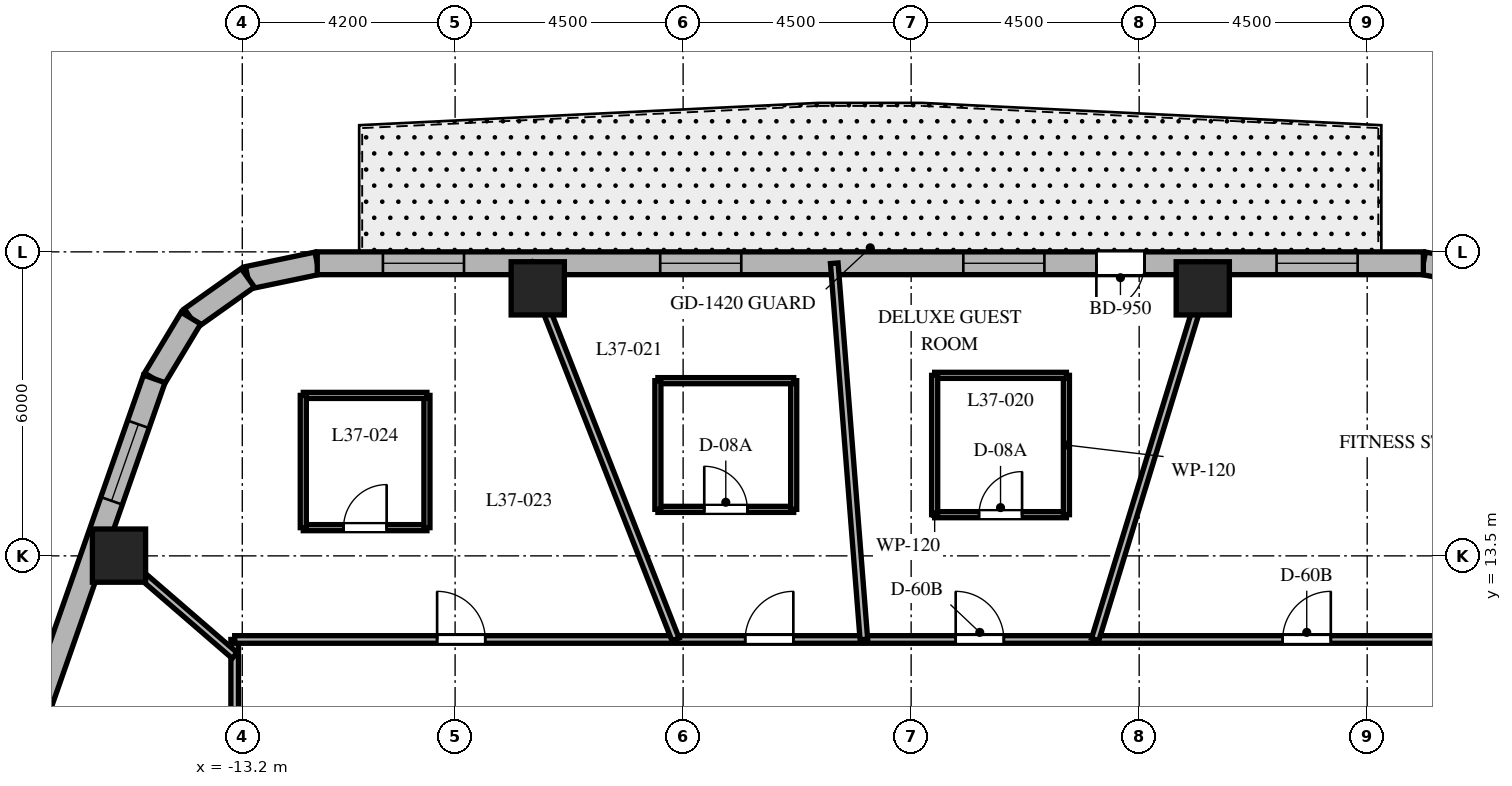
"""IFC4 building model, lengths in metres.
Left out: names, types, materials, properties, quantities, classifications, styles, units other than length and angle.
Written with IfcOpenShell. Run it as: python <this file> out.ifc"""

import sys

from ifc_helpers import new_model, si_unit, direction, frame, frame_2d, origin, origin_2d, place, context, subcontext, project, spatial, rectangle, extrude, element, fill, save


model = new_model("IFC4")
c1 = context("Model", 3, precision=1e-05, world=origin(), true_north=direction((0.0, 1.0)))
c2 = subcontext(c1, "Body", "Model", "MODEL_VIEW")
j1 = project(units=[si_unit("LENGTHUNIT", "METRE"), si_unit("PLANEANGLEUNIT", "RADIAN")], contexts=[c1])
p1 = place(None, origin())
s1 = spatial("IfcSite", under=j1, at=p1, CompositionType="ELEMENT")
p2 = place(p1, origin())
s2 = spatial("IfcBuilding", under=s1, at=p2, CompositionType="ELEMENT")
p3 = place(p2, frame((0.0, 0.0, 151.7)))
s3 = spatial("IfcBuildingStorey", under=s2, at=p3, CompositionType="ELEMENT", Elevation=151.7)
for number, where, z_axis, x_axis in (
    (1, (5.755, 18.78, 0.0), (0.0, 0.0, 1.0), (1.0, 0.0, 0.0)),
    (2, (-7.369, 18.78, 0.0), (0.0, 0.0, 1.0), (1.0, 0.0, 0.0)),
    (3, (-15.633, 13.505, 0.0), (0.0, 0.0, 1.0), (1.0, 0.0, 0.0)),
):
    element("IfcColumn", number, at=place(p3, frame(where, z_axis=z_axis, x_axis=x_axis)), inside=s3, PredefinedType="COLUMN", context=c2, shape_type="SweptSolid", body=[
        extrude(rectangle(XDim=1.05, YDim=1.05, at=origin_2d()), origin(), (0.0, 0.0, 1.0), 3.7),
    ])
p4 = place(p3, frame((11.349, 19.043, 0.0), z_axis=(0.0, 0.0, 1.0), x_axis=(-0.982931267051, 0.183973161772, 0.0)))
e4 = element("IfcWall", 4, at=p4, inside=s3, PredefinedType="SOLIDWALL", context=c2, shape_type="SweptSolid", body=[
    extrude(rectangle(XDim=1.262, YDim=0.45, at=frame_2d((0.631, 0.0))), origin(), (0.0, 0.0, 1.0), 3.4),
])
p5 = place(p3, frame((-11.72, 19.275, 0.0), z_axis=(0.0, 0.0, 1.0), x_axis=(-0.97893106758, -0.204191001093, 0.0)))
e5 = element("IfcWall", 5, at=p5, inside=s3, PredefinedType="SOLIDWALL", context=c2, shape_type="SweptSolid", body=[
    extrude(rectangle(XDim=1.4, YDim=0.45, at=frame_2d((0.7, 0.0))), origin(), (0.0, 0.0, 1.0), 3.4),
])
p6 = place(p3, frame((-13.091, 18.989, 0.0), z_axis=(0.0, 0.0, 1.0), x_axis=(-0.815574637848, -0.578651890258, 0.0)))
e6 = element("IfcWall", 6, at=p6, inside=s3, PredefinedType="SOLIDWALL", context=c2, shape_type="SweptSolid", body=[
    extrude(rectangle(XDim=1.377, YDim=0.45, at=frame_2d((0.688, 0.0))), origin(), (0.0, 0.0, 1.0), 3.4),
])
p7 = place(p3, frame((-14.214, 18.192, 0.0), z_axis=(0.0, 0.0, 1.0), x_axis=(-0.516340945502, -0.856383108193, 0.0)))
e7 = element("IfcWall", 7, at=p7, inside=s3, PredefinedType="SOLIDWALL", context=c2, shape_type="SweptSolid", body=[
    extrude(rectangle(XDim=1.4, YDim=0.45, at=frame_2d((0.7, 0.0))), origin(), (0.0, 0.0, 1.0), 3.4),
])
p8 = place(p3, frame((10.108, 19.275, 0.0), z_axis=(0.0, 0.0, 1.0), x_axis=(-1.0, 0.0, 0.0)))
e8 = element("IfcWall", 8, at=p8, inside=s3, PredefinedType="SOLIDWALL", context=c2, shape_type="SweptSolid", body=[
    extrude(rectangle(XDim=21.829, YDim=0.45, at=frame_2d((10.915, 0.0))), origin(), (0.0, 0.0, 1.0), 3.4),
])
p9 = place(p8, frame((5.503, 0.0, 0.0)))
e9 = element("IfcOpeningElement", 9, at=p9, cuts=e8, PredefinedType="OPENING", context=c2, shape_type="SweptSolid", body=[
    extrude(rectangle(XDim=0.95, YDim=2.15, at=frame_2d((0.475, 1.075))), frame((0.0, 0.235, 0.0), z_axis=(0.0, -1.0, 0.0), x_axis=(1.0, 0.0, 0.0)), (0.0, 0.0, 1.0), 0.47),
])
p10 = place(p8, frame((1.297, 0.0, 0.8)))
e10 = element("IfcOpeningElement", 10, at=p10, cuts=e8, PredefinedType="OPENING", context=c2, shape_type="SweptSolid", body=[
    extrude(rectangle(XDim=1.6, YDim=1.75, at=frame_2d((0.8, 0.875))), frame((0.0, 0.235, 0.0), z_axis=(0.0, -1.0, 0.0), x_axis=(1.0, 0.0, 0.0)), (0.0, 0.0, 1.0), 0.47),
])
p11 = place(p8, frame((7.479, 0.0, 0.8)))
e11 = element("IfcOpeningElement", 11, at=p11, cuts=e8, PredefinedType="OPENING", context=c2, shape_type="SweptSolid", body=[
    extrude(rectangle(XDim=1.6, YDim=1.75, at=frame_2d((0.8, 0.875))), frame((0.0, 0.235, 0.0), z_axis=(0.0, -1.0, 0.0), x_axis=(1.0, 0.0, 0.0)), (0.0, 0.0, 1.0), 0.47),
])
p12 = place(p8, frame((13.461, 0.0, 0.8)))
e12 = element("IfcOpeningElement", 12, at=p12, cuts=e8, PredefinedType="OPENING", context=c2, shape_type="SweptSolid", body=[
    extrude(rectangle(XDim=1.6, YDim=1.75, at=frame_2d((0.8, 0.875))), frame((0.0, 0.235, 0.0), z_axis=(0.0, -1.0, 0.0), x_axis=(1.0, 0.0, 0.0)), (0.0, 0.0, 1.0), 0.47),
])
p13 = place(p8, frame((18.933, 0.0, 0.8)))
e13 = element("IfcOpeningElement", 13, at=p13, cuts=e8, PredefinedType="OPENING", context=c2, shape_type="SweptSolid", body=[
    extrude(rectangle(XDim=1.6, YDim=1.75, at=frame_2d((0.8, 0.875))), frame((0.0, 0.235, 0.0), z_axis=(0.0, -1.0, 0.0), x_axis=(1.0, 0.0, 0.0)), (0.0, 0.0, 1.0), 0.47),
])
p14 = place(p3, frame((-14.937, 16.993, 0.0), z_axis=(0.0, 0.0, 1.0), x_axis=(-0.330431575061, -0.943829949834, 0.0)))
e14 = element("IfcWall", 14, at=p14, inside=s3, PredefinedType="SOLIDWALL", context=c2, shape_type="SweptSolid", body=[
    extrude(rectangle(XDim=17.689, YDim=0.45, at=frame_2d((8.844, 0.0))), origin(), (0.0, 0.0, 1.0), 3.4),
])
p15 = place(p14, frame((0.95, 0.0, 0.8)))
e15 = element("IfcOpeningElement", 15, at=p15, cuts=e14, PredefinedType="OPENING", context=c2, shape_type="SweptSolid", body=[
    extrude(rectangle(XDim=1.6, YDim=1.75, at=frame_2d((0.8, 0.875))), frame((0.0, 0.235, 0.0), z_axis=(0.0, -1.0, 0.0), x_axis=(1.0, 0.0, 0.0)), (0.0, 0.0, 1.0), 0.47),
])
p16 = place(p14, frame((7.99, 0.0, 0.8)))
e16 = element("IfcOpeningElement", 16, at=p16, cuts=e14, PredefinedType="OPENING", context=c2, shape_type="SweptSolid", body=[
    extrude(rectangle(XDim=1.6, YDim=1.75, at=frame_2d((0.8, 0.875))), frame((0.0, 0.235, 0.0), z_axis=(0.0, -1.0, 0.0), x_axis=(1.0, 0.0, 0.0)), (0.0, 0.0, 1.0), 0.47),
])
p17 = place(p14, frame((15.084, 0.0, 0.8)))
e17 = element("IfcOpeningElement", 17, at=p17, cuts=e14, PredefinedType="OPENING", context=c2, shape_type="SweptSolid", body=[
    extrude(rectangle(XDim=1.6, YDim=1.75, at=frame_2d((0.8, 0.875))), frame((0.0, 0.235, 0.0), z_axis=(0.0, -1.0, 0.0), x_axis=(1.0, 0.0, 0.0)), (0.0, 0.0, 1.0), 0.47),
])
p18 = place(p3, frame((-13.35, -11.85, 0.0), z_axis=(0.0, 0.0, 1.0), x_axis=(0.0, 1.0, 0.0)))
e18 = element("IfcWall", 18, at=p18, inside=s3, PredefinedType="PARTITIONING", context=c2, shape_type="SweptSolid", body=[
    extrude(rectangle(XDim=23.7, YDim=0.15, at=frame_2d((11.85, 0.0))), origin(), (0.0, 0.0, 1.0), 2.84),
])
p19 = place(p18, frame((18.389, 0.0, 0.0)))
e19 = element("IfcOpeningElement", 19, at=p19, cuts=e18, PredefinedType="OPENING", context=c2, shape_type="SweptSolid", body=[
    extrude(rectangle(XDim=0.95, YDim=2.03, at=frame_2d((0.475, 1.015))), frame((0.0, 0.085, 0.0), z_axis=(0.0, -1.0, 0.0), x_axis=(1.0, 0.0, 0.0)), (0.0, 0.0, 1.0), 0.17),
])
p20 = place(p18, frame((10.751, 0.0, 0.0)))
e20 = element("IfcOpeningElement", 20, at=p20, cuts=e18, PredefinedType="OPENING", context=c2, shape_type="SweptSolid", body=[
    extrude(rectangle(XDim=0.95, YDim=2.03, at=frame_2d((0.475, 1.015))), frame((0.0, 0.085, 0.0), z_axis=(0.0, -1.0, 0.0), x_axis=(1.0, 0.0, 0.0)), (0.0, 0.0, 1.0), 0.17),
])
p21 = place(p18, frame((5.951, 0.0, 0.0)))
e21 = element("IfcOpeningElement", 21, at=p21, cuts=e18, PredefinedType="OPENING", context=c2, shape_type="SweptSolid", body=[
    extrude(rectangle(XDim=0.9, YDim=2.03, at=frame_2d((0.45, 1.015))), frame((0.0, 0.085, 0.0), z_axis=(0.0, -1.0, 0.0), x_axis=(1.0, 0.0, 0.0)), (0.0, 0.0, 1.0), 0.17),
])
p22 = place(p18, frame((1.993, 0.0, 0.0)))
e22 = element("IfcOpeningElement", 22, at=p22, cuts=e18, PredefinedType="OPENING", context=c2, shape_type="SweptSolid", body=[
    extrude(rectangle(XDim=0.9, YDim=2.03, at=frame_2d((0.45, 1.015))), frame((0.0, 0.085, 0.0), z_axis=(0.0, -1.0, 0.0), x_axis=(1.0, 0.0, 0.0)), (0.0, 0.0, 1.0), 0.17),
])
p23 = place(p3, frame((-13.35, 11.85, 0.0), z_axis=(0.0, 0.0, 1.0), x_axis=(1.0, 0.0, 0.0)))
e23 = element("IfcWall", 23, at=p23, inside=s3, PredefinedType="PARTITIONING", context=c2, shape_type="SweptSolid", body=[
    extrude(rectangle(XDim=26.7, YDim=0.15, at=frame_2d((13.35, 0.0))), origin(), (0.0, 0.0, 1.0), 2.84),
])
p24 = place(p23, frame((20.682, 0.0, 0.0)))
e24 = element("IfcOpeningElement", 24, at=p24, cuts=e23, PredefinedType="OPENING", context=c2, shape_type="SweptSolid", body=[
    extrude(rectangle(XDim=0.95, YDim=2.03, at=frame_2d((0.475, 1.015))), frame((0.0, 0.085, 0.0), z_axis=(0.0, -1.0, 0.0), x_axis=(1.0, 0.0, 0.0)), (0.0, 0.0, 1.0), 0.17),
])
p25 = place(p23, frame((14.229, 0.0, 0.0)))
e25 = element("IfcOpeningElement", 25, at=p25, cuts=e23, PredefinedType="OPENING", context=c2, shape_type="SweptSolid", body=[
    extrude(rectangle(XDim=0.95, YDim=2.03, at=frame_2d((0.475, 1.015))), frame((0.0, 0.085, 0.0), z_axis=(0.0, -1.0, 0.0), x_axis=(1.0, 0.0, 0.0)), (0.0, 0.0, 1.0), 0.17),
])
p26 = place(p23, frame((10.075, 0.0, 0.0)))
e26 = element("IfcOpeningElement", 26, at=p26, cuts=e23, PredefinedType="OPENING", context=c2, shape_type="SweptSolid", body=[
    extrude(rectangle(XDim=0.95, YDim=2.03, at=frame_2d((0.475, 1.015))), frame((0.0, 0.085, 0.0), z_axis=(0.0, -1.0, 0.0), x_axis=(1.0, 0.0, 0.0)), (0.0, 0.0, 1.0), 0.17),
])
p27 = place(p23, frame((3.995, 0.0, 0.0)))
e27 = element("IfcOpeningElement", 27, at=p27, cuts=e23, PredefinedType="OPENING", context=c2, shape_type="SweptSolid", body=[
    extrude(rectangle(XDim=0.95, YDim=2.03, at=frame_2d((0.475, 1.015))), frame((0.0, 0.085, 0.0), z_axis=(0.0, -1.0, 0.0), x_axis=(1.0, 0.0, 0.0)), (0.0, 0.0, 1.0), 0.17),
])
p28 = place(p3, frame((3.631, 11.85, 0.0), z_axis=(0.0, 0.0, 1.0), x_axis=(0.293007573338, 0.956110120209, 0.0)))
e28 = element("IfcWall", 28, at=p28, inside=s3, PredefinedType="PARTITIONING", context=c2, shape_type="SweptSolid", body=[
    extrude(rectangle(XDim=7.766, YDim=0.15, at=frame_2d((3.883, 0.0))), origin(), (0.0, 0.0, 1.0), 2.64),
])
p29 = place(p3, frame((-0.933, 11.85, 0.0), z_axis=(0.0, 0.0, 1.0), x_axis=(-0.078476156849, 0.996915990847, 0.0)))
e29 = element("IfcWall", 29, at=p29, inside=s3, PredefinedType="PARTITIONING", context=c2, shape_type="SweptSolid", body=[
    extrude(rectangle(XDim=7.448, YDim=0.15, at=frame_2d((3.724, 0.0))), origin(), (0.0, 0.0, 1.0), 2.64),
])
p30 = place(p3, frame((-4.65, 11.85, 0.0), z_axis=(0.0, 0.0, 1.0), x_axis=(-0.365265947993, 0.930903210456, 0.0)))
e30 = element("IfcWall", 30, at=p30, inside=s3, PredefinedType="PARTITIONING", context=c2, shape_type="SweptSolid", body=[
    extrude(rectangle(XDim=7.976, YDim=0.15, at=frame_2d((3.988, 0.0))), origin(), (0.0, 0.0, 1.0), 2.64),
])
p31 = place(p3, frame((-13.35, 11.533, 0.0), z_axis=(0.0, 0.0, 1.0), x_axis=(-0.756711647314, 0.65374879183, 0.0)))
e31 = element("IfcWall", 31, at=p31, inside=s3, PredefinedType="PARTITIONING", context=c2, shape_type="SweptSolid", body=[
    extrude(rectangle(XDim=3.55, YDim=0.15, at=frame_2d((1.775, 0.0))), origin(), (0.0, 0.0, 1.0), 2.64),
])
p32 = place(p3, frame((0.464, 14.313, 0.0), z_axis=(0.0, 0.0, 1.0), x_axis=(1.0, 0.0, 0.0)))
e32 = element("IfcWall", 32, at=p32, inside=s3, PredefinedType="PARTITIONING", context=c2, shape_type="SweptSolid", body=[
    extrude(rectangle(XDim=2.6, YDim=0.12, at=frame_2d((1.3, 0.0))), origin(), (0.0, 0.0, 1.0), 3.4),
])
p33 = place(p32, frame((0.875, 0.0, 0.0)))
e33 = element("IfcOpeningElement", 33, at=p33, cuts=e32, PredefinedType="OPENING", context=c2, shape_type="SweptSolid", body=[
    extrude(rectangle(XDim=0.85, YDim=2.03, at=frame_2d((0.425, 1.015))), frame((0.0, 0.07, 0.0), z_axis=(0.0, -1.0, 0.0), x_axis=(1.0, 0.0, 0.0)), (0.0, 0.0, 1.0), 0.14),
])
p34 = place(p3, frame((3.064, 14.313, 0.0), z_axis=(0.0, 0.0, 1.0), x_axis=(0.0, 1.0, 0.0)))
e34 = element("IfcWall", 34, at=p34, inside=s3, PredefinedType="PARTITIONING", context=c2, shape_type="SweptSolid", body=[
    extrude(rectangle(XDim=2.75, YDim=0.12, at=frame_2d((1.375, 0.0))), origin(), (0.0, 0.0, 1.0), 2.84),
])
p35 = place(p3, frame((3.064, 17.063, 0.0), z_axis=(0.0, 0.0, 1.0), x_axis=(-1.0, 0.0, 0.0)))
e35 = element("IfcWall", 35, at=p35, inside=s3, PredefinedType="PARTITIONING", context=c2, shape_type="SweptSolid", body=[
    extrude(rectangle(XDim=2.6, YDim=0.12, at=frame_2d((1.3, 0.0))), origin(), (0.0, 0.0, 1.0), 3.4),
])
p36 = place(p3, frame((0.464, 17.063, 0.0), z_axis=(0.0, 0.0, 1.0), x_axis=(0.0, -1.0, 0.0)))
e36 = element("IfcWall", 36, at=p36, inside=s3, PredefinedType="PARTITIONING", context=c2, shape_type="SweptSolid", body=[
    extrude(rectangle(XDim=2.75, YDim=0.12, at=frame_2d((1.375, 0.0))), origin(), (0.0, 0.0, 1.0), 2.84),
])
p37 = place(p3, frame((-4.998, 14.418, 0.0), z_axis=(0.0, 0.0, 1.0), x_axis=(1.0, 0.0, 0.0)))
e37 = element("IfcWall", 37, at=p37, inside=s3, PredefinedType="PARTITIONING", context=c2, shape_type="SweptSolid", body=[
    extrude(rectangle(XDim=2.68, YDim=0.12, at=frame_2d((1.34, 0.0))), origin(), (0.0, 0.0, 1.0), 3.4),
])
p38 = place(p37, frame((0.915, 0.0, 0.0)))
e38 = element("IfcOpeningElement", 38, at=p38, cuts=e37, PredefinedType="OPENING", context=c2, shape_type="SweptSolid", body=[
    extrude(rectangle(XDim=0.85, YDim=2.03, at=frame_2d((0.425, 1.015))), frame((0.0, 0.07, 0.0), z_axis=(0.0, -1.0, 0.0), x_axis=(1.0, 0.0, 0.0)), (0.0, 0.0, 1.0), 0.14),
])
p39 = place(p3, frame((-2.318, 14.418, 0.0), z_axis=(0.0, 0.0, 1.0), x_axis=(0.0, 1.0, 0.0)))
e39 = element("IfcWall", 39, at=p39, inside=s3, PredefinedType="PARTITIONING", context=c2, shape_type="SweptSolid", body=[
    extrude(rectangle(XDim=2.54, YDim=0.12, at=frame_2d((1.27, 0.0))), origin(), (0.0, 0.0, 1.0), 2.84),
])
p40 = place(p3, frame((-2.318, 16.958, 0.0), z_axis=(0.0, 0.0, 1.0), x_axis=(-1.0, 0.0, 0.0)))
e40 = element("IfcWall", 40, at=p40, inside=s3, PredefinedType="PARTITIONING", context=c2, shape_type="SweptSolid", body=[
    extrude(rectangle(XDim=2.68, YDim=0.12, at=frame_2d((1.34, 0.0))), origin(), (0.0, 0.0, 1.0), 3.4),
])
p41 = place(p3, frame((-4.998, 16.958, 0.0), z_axis=(0.0, 0.0, 1.0), x_axis=(0.0, -1.0, 0.0)))
e41 = element("IfcWall", 41, at=p41, inside=s3, PredefinedType="PARTITIONING", context=c2, shape_type="SweptSolid", body=[
    extrude(rectangle(XDim=2.54, YDim=0.12, at=frame_2d((1.27, 0.0))), origin(), (0.0, 0.0, 1.0), 2.84),
])
p42 = place(p3, frame((-11.996, 14.057, 0.0), z_axis=(0.0, 0.0, 1.0), x_axis=(1.0, 0.0, 0.0)))
e42 = element("IfcWall", 42, at=p42, inside=s3, PredefinedType="PARTITIONING", context=c2, shape_type="SweptSolid", body=[
    extrude(rectangle(XDim=2.44, YDim=0.12, at=frame_2d((1.22, 0.0))), origin(), (0.0, 0.0, 1.0), 2.927),
])
p43 = place(p42, frame((0.795, 0.0, 0.0)))
e43 = element("IfcOpeningElement", 43, at=p43, cuts=e42, PredefinedType="OPENING", context=c2, shape_type="SweptSolid", body=[
    extrude(rectangle(XDim=0.85, YDim=2.03, at=frame_2d((0.425, 1.015))), frame((0.0, 0.07, 0.0), z_axis=(0.0, -1.0, 0.0), x_axis=(1.0, 0.0, 0.0)), (0.0, 0.0, 1.0), 0.14),
])
p44 = place(p3, frame((-9.556, 14.057, 0.0), z_axis=(0.0, 0.0, 1.0), x_axis=(0.0, 1.0, 0.0)))
e44 = element("IfcWall", 44, at=p44, inside=s3, PredefinedType="PARTITIONING", context=c2, shape_type="SweptSolid", body=[
    extrude(rectangle(XDim=2.61, YDim=0.12, at=frame_2d((1.305, 0.0))), origin(), (0.0, 0.0, 1.0), 2.927),
])
p45 = place(p3, frame((-9.556, 16.667, 0.0), z_axis=(0.0, 0.0, 1.0), x_axis=(-1.0, 0.0, 0.0)))
e45 = element("IfcWall", 45, at=p45, inside=s3, PredefinedType="PARTITIONING", context=c2, shape_type="SweptSolid", body=[
    extrude(rectangle(XDim=2.44, YDim=0.12, at=frame_2d((1.22, 0.0))), origin(), (0.0, 0.0, 1.0), 2.64),
])
p46 = place(p3, frame((-11.996, 16.667, 0.0), z_axis=(0.0, 0.0, 1.0), x_axis=(0.0, -1.0, 0.0)))
e46 = element("IfcWall", 46, at=p46, inside=s3, PredefinedType="PARTITIONING", context=c2, shape_type="SweptSolid", body=[
    extrude(rectangle(XDim=2.61, YDim=0.12, at=frame_2d((1.305, 0.0))), origin(), (0.0, 0.0, 1.0), 2.64),
])
p47 = place(p9, origin())
e47 = element("IfcDoor", 47, at=p47, inside=s3, OperationType="SINGLE_SWING_RIGHT", PredefinedType="DOOR", context=c2, shape_type="SweptSolid", body=[
    extrude(rectangle(XDim=0.95, YDim=2.15, at=frame_2d((0.475, 1.075))), frame((0.0, 0.025, 0.0), z_axis=(0.0, -1.0, 0.0), x_axis=(1.0, 0.0, 0.0)), (0.0, 0.0, 1.0), 0.05),
])
fill(e9, e47)
p48 = place(p10, origin())
e48 = element("IfcWindow", 48, at=p48, inside=s3, PartitioningType="SINGLE_PANEL", PredefinedType="WINDOW", context=c2, shape_type="SweptSolid", body=[
    extrude(rectangle(XDim=1.6, YDim=1.75, at=frame_2d((0.8, 0.875))), frame((0.0, 0.03, 0.0), z_axis=(0.0, -1.0, 0.0), x_axis=(1.0, 0.0, 0.0)), (0.0, 0.0, 1.0), 0.06),
])
fill(e10, e48)
p49 = place(p11, origin())
e49 = element("IfcWindow", 49, at=p49, inside=s3, PartitioningType="SINGLE_PANEL", PredefinedType="WINDOW", context=c2, shape_type="SweptSolid", body=[
    extrude(rectangle(XDim=1.6, YDim=1.75, at=frame_2d((0.8, 0.875))), frame((0.0, 0.03, 0.0), z_axis=(0.0, -1.0, 0.0), x_axis=(1.0, 0.0, 0.0)), (0.0, 0.0, 1.0), 0.06),
])
fill(e11, e49)
p50 = place(p12, origin())
e50 = element("IfcWindow", 50, at=p50, inside=s3, PartitioningType="SINGLE_PANEL", PredefinedType="WINDOW", context=c2, shape_type="SweptSolid", body=[
    extrude(rectangle(XDim=1.6, YDim=1.75, at=frame_2d((0.8, 0.875))), frame((0.0, 0.03, 0.0), z_axis=(0.0, -1.0, 0.0), x_axis=(1.0, 0.0, 0.0)), (0.0, 0.0, 1.0), 0.06),
])
fill(e12, e50)
p51 = place(p13, origin())
e51 = element("IfcWindow", 51, at=p51, inside=s3, PartitioningType="SINGLE_PANEL", PredefinedType="WINDOW", context=c2, shape_type="SweptSolid", body=[
    extrude(rectangle(XDim=1.6, YDim=1.75, at=frame_2d((0.8, 0.875))), frame((0.0, 0.03, 0.0), z_axis=(0.0, -1.0, 0.0), x_axis=(1.0, 0.0, 0.0)), (0.0, 0.0, 1.0), 0.06),
])
fill(e13, e51)
p52 = place(p15, origin())
e52 = element("IfcWindow", 52, at=p52, inside=s3, PartitioningType="SINGLE_PANEL", PredefinedType="WINDOW", context=c2, shape_type="SweptSolid", body=[
    extrude(rectangle(XDim=1.6, YDim=1.75, at=frame_2d((0.8, 0.875))), frame((0.0, 0.03, 0.0), z_axis=(0.0, -1.0, 0.0), x_axis=(1.0, 0.0, 0.0)), (0.0, 0.0, 1.0), 0.06),
])
fill(e15, e52)
p53 = place(p24, origin())
e53 = element("IfcDoor", 53, at=p53, inside=s3, OperationType="SINGLE_SWING_RIGHT", PredefinedType="DOOR", context=c2, shape_type="SweptSolid", body=[
    extrude(rectangle(XDim=0.95, YDim=2.03, at=frame_2d((0.475, 1.015))), frame((0.0, 0.025, 0.0), z_axis=(0.0, -1.0, 0.0), x_axis=(1.0, 0.0, 0.0)), (0.0, 0.0, 1.0), 0.05),
])
fill(e24, e53)
p54 = place(p25, origin())
e54 = element("IfcDoor", 54, at=p54, inside=s3, OperationType="SINGLE_SWING_LEFT", PredefinedType="DOOR", context=c2, shape_type="SweptSolid", body=[
    extrude(rectangle(XDim=0.95, YDim=2.03, at=frame_2d((0.475, 1.015))), frame((0.0, 0.025, 0.0), z_axis=(0.0, -1.0, 0.0), x_axis=(1.0, 0.0, 0.0)), (0.0, 0.0, 1.0), 0.05),
])
fill(e25, e54)
p55 = place(p33, origin())
e55 = element("IfcDoor", 55, at=p55, inside=s3, OperationType="SINGLE_SWING_RIGHT", PredefinedType="DOOR", context=c2, shape_type="SweptSolid", body=[
    extrude(rectangle(XDim=0.85, YDim=2.03, at=frame_2d((0.425, 1.015))), frame((0.0, 0.025, 0.0), z_axis=(0.0, -1.0, 0.0), x_axis=(1.0, 0.0, 0.0)), (0.0, 0.0, 1.0), 0.05),
])
fill(e33, e55)
p56 = place(p26, origin())
e56 = element("IfcDoor", 56, at=p56, inside=s3, OperationType="SINGLE_SWING_RIGHT", PredefinedType="DOOR", context=c2, shape_type="SweptSolid", body=[
    extrude(rectangle(XDim=0.95, YDim=2.03, at=frame_2d((0.475, 1.015))), frame((0.0, 0.025, 0.0), z_axis=(0.0, -1.0, 0.0), x_axis=(1.0, 0.0, 0.0)), (0.0, 0.0, 1.0), 0.05),
])
fill(e26, e56)
p57 = place(p38, origin())
e57 = element("IfcDoor", 57, at=p57, inside=s3, OperationType="SINGLE_SWING_LEFT", PredefinedType="DOOR", context=c2, shape_type="SweptSolid", body=[
    extrude(rectangle(XDim=0.85, YDim=2.03, at=frame_2d((0.425, 1.015))), frame((0.0, 0.025, 0.0), z_axis=(0.0, -1.0, 0.0), x_axis=(1.0, 0.0, 0.0)), (0.0, 0.0, 1.0), 0.05),
])
fill(e38, e57)
p58 = place(p27, origin())
e58 = element("IfcDoor", 58, at=p58, inside=s3, OperationType="SINGLE_SWING_LEFT", PredefinedType="DOOR", context=c2, shape_type="SweptSolid", body=[
    extrude(rectangle(XDim=0.95, YDim=2.03, at=frame_2d((0.475, 1.015))), frame((0.0, 0.025, 0.0), z_axis=(0.0, -1.0, 0.0), x_axis=(1.0, 0.0, 0.0)), (0.0, 0.0, 1.0), 0.05),
])
fill(e27, e58)
p59 = place(p43, origin())
e59 = element("IfcDoor", 59, at=p59, inside=s3, OperationType="SINGLE_SWING_RIGHT", PredefinedType="DOOR", context=c2, shape_type="SweptSolid", body=[
    extrude(rectangle(XDim=0.85, YDim=2.03, at=frame_2d((0.425, 1.015))), frame((0.0, 0.025, 0.0), z_axis=(0.0, -1.0, 0.0), x_axis=(1.0, 0.0, 0.0)), (0.0, 0.0, 1.0), 0.05),
])
fill(e43, e59)
save(model, sys.argv[1])
